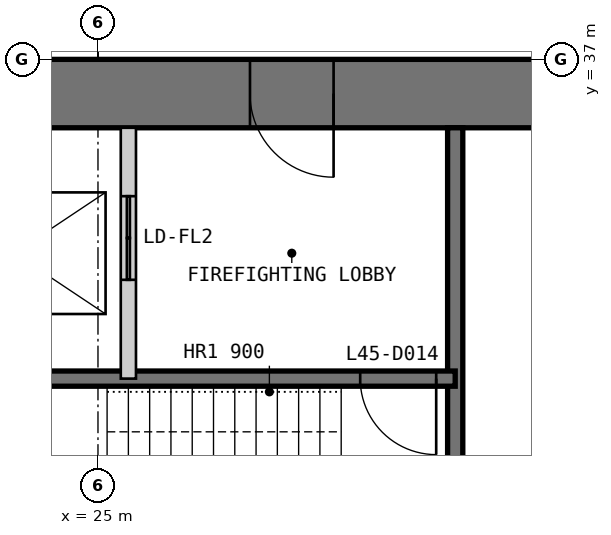
"""IFC4 building model, lengths in metres.
Left out: names, types, materials, properties, quantities, classifications, styles, units other than length and angle.
Written with IfcOpenShell. Run it as: python <this file> out.ifc"""

import sys

from ifc_helpers import new_model, si_unit, direction, frame, frame_2d, origin, place, context, subcontext, project, spatial, polyline, rectangle, outline, extrude, element, fill, save


model = new_model("IFC4")
c1 = context("Model", 3, precision=1e-05, world=origin(), true_north=direction((0.0, 1.0)))
c2 = subcontext(c1, "Body", "Model", "MODEL_VIEW")
j1 = project(units=[si_unit("LENGTHUNIT", "METRE"), si_unit("PLANEANGLEUNIT", "RADIAN")], contexts=[c1])
p1 = place(None, origin())
s1 = spatial("IfcSite", under=j1, at=p1, CompositionType="ELEMENT")
p2 = place(p1, origin())
s2 = spatial("IfcBuilding", under=s1, at=p2, CompositionType="ELEMENT")
p3 = place(p2, frame((0.0, 0.0, 193.8)))
s3 = spatial("IfcBuildingStorey", under=s2, at=p3, CompositionType="ELEMENT", Elevation=193.8)
p4 = place(p3, frame((37.0, 36.55, 0.0), z_axis=(0.0, 0.0, 1.0), x_axis=(-1.0, 0.0, 0.0)))
e1 = element("IfcWall", 1, at=p4, inside=s3, PredefinedType="SHEAR", context=c2, shape_type="SweptSolid", body=[
    extrude(outline(polyline([(0.0, -0.45), (24.0, -0.45), (23.1, 0.45), (0.9, 0.45), (0.0, -0.45)])), origin(), (0.0, 0.0, 1.0), 4.0),
])
p5 = place(p4, frame((4.9, 0.0, 0.0)))
e2 = element("IfcOpeningElement", 2, at=p5, cuts=e1, PredefinedType="OPENING", context=c2, shape_type="SweptSolid", body=[
    extrude(rectangle(XDim=1.0, YDim=2.2, at=frame_2d((0.5, 1.1))), frame((0.0, 0.46, 0.0), z_axis=(0.0, -1.0, 0.0), x_axis=(1.0, 0.0, 0.0)), (0.0, 0.0, 1.0), 0.92),
])
p6 = place(p4, frame((8.9, 0.0, 0.0)))
e3 = element("IfcOpeningElement", 3, at=p6, cuts=e1, PredefinedType="OPENING", context=c2, shape_type="SweptSolid", body=[
    extrude(rectangle(XDim=1.1, YDim=2.2, at=frame_2d((0.55, 1.1))), frame((0.0, 0.46, 0.0), z_axis=(0.0, -1.0, 0.0), x_axis=(1.0, 0.0, 0.0)), (0.0, 0.0, 1.0), 0.92),
])
p7 = place(p4, frame((15.05, 0.0, 0.0)))
e4 = element("IfcOpeningElement", 4, at=p7, cuts=e1, PredefinedType="OPENING", context=c2, shape_type="SweptSolid", body=[
    extrude(rectangle(XDim=0.9, YDim=2.2, at=frame_2d((0.45, 1.1))), frame((0.0, 0.46, 0.0), z_axis=(0.0, -1.0, 0.0), x_axis=(1.0, 0.0, 0.0)), (0.0, 0.0, 1.0), 0.92),
])
p8 = place(p4, frame((17.9, 0.0, 0.0)))
e5 = element("IfcOpeningElement", 5, at=p8, cuts=e1, PredefinedType="OPENING", context=c2, shape_type="SweptSolid", body=[
    extrude(rectangle(XDim=1.0, YDim=2.2, at=frame_2d((0.5, 1.1))), frame((0.0, 0.46, 0.0), z_axis=(0.0, -1.0, 0.0), x_axis=(1.0, 0.0, 0.0)), (0.0, 0.0, 1.0), 0.92),
])
p9 = place(p4, frame((21.4, 0.0, 0.0)))
e6 = element("IfcOpeningElement", 6, at=p9, cuts=e1, PredefinedType="OPENING", context=c2, shape_type="SweptSolid", body=[
    extrude(rectangle(XDim=1.0, YDim=2.2, at=frame_2d((0.5, 1.1))), frame((0.0, 0.46, 0.0), z_axis=(0.0, -1.0, 0.0), x_axis=(1.0, 0.0, 0.0)), (0.0, 0.0, 1.0), 0.92),
])
p10 = place(p3, frame((29.7, 36.1, 0.0), z_axis=(0.0, 0.0, 1.0), x_axis=(0.0, -1.0, 0.0)))
e7 = element("IfcWall", 7, at=p10, inside=s3, PredefinedType="SOLIDWALL", context=c2, shape_type="SweptSolid", body=[
    extrude(rectangle(XDim=16.1, YDim=0.2, at=frame_2d((8.05, 0.0))), origin(), (0.0, 0.0, 1.0), 3.8),
])
p11 = place(p10, frame((7.217, 0.0, 0.0)))
e8 = element("IfcOpeningElement", 8, at=p11, cuts=e7, PredefinedType="OPENING", context=c2, shape_type="SweptSolid", body=[
    extrude(rectangle(XDim=1.1, YDim=2.2, at=frame_2d((0.55, 1.1))), frame((0.0, 0.11, 0.0), z_axis=(0.0, -1.0, 0.0), x_axis=(1.0, 0.0, 0.0)), (0.0, 0.0, 1.0), 0.22),
])
p12 = place(p10, frame((10.55, 0.0, 0.0)))
e9 = element("IfcOpeningElement", 9, at=p12, cuts=e7, PredefinedType="OPENING", context=c2, shape_type="SweptSolid", body=[
    extrude(rectangle(XDim=1.1, YDim=2.2, at=frame_2d((0.55, 1.1))), frame((0.0, 0.11, 0.0), z_axis=(0.0, -1.0, 0.0), x_axis=(1.0, 0.0, 0.0)), (0.0, 0.0, 1.0), 0.22),
])
p13 = place(p10, frame((13.883, 0.0, 0.0)))
e10 = element("IfcOpeningElement", 10, at=p13, cuts=e7, PredefinedType="OPENING", context=c2, shape_type="SweptSolid", body=[
    extrude(rectangle(XDim=1.1, YDim=2.2, at=frame_2d((0.55, 1.1))), frame((0.0, 0.11, 0.0), z_axis=(0.0, -1.0, 0.0), x_axis=(1.0, 0.0, 0.0)), (0.0, 0.0, 1.0), 0.22),
])
p14 = place(p3, frame((29.7, 32.8, 0.0), z_axis=(0.0, 0.0, 1.0), x_axis=(-1.0, 0.0, 0.0)))
e11 = element("IfcWall", 11, at=p14, inside=s3, PredefinedType="SOLIDWALL", context=c2, shape_type="SweptSolid", body=[
    extrude(rectangle(XDim=9.4, YDim=0.2, at=frame_2d((4.7, 0.0))), origin(), (0.0, 0.0, 1.0), 3.8),
])
p15 = place(p14, frame((0.25, 0.0, 0.0)))
e12 = element("IfcOpeningElement", 12, at=p15, cuts=e11, PredefinedType="OPENING", context=c2, shape_type="SweptSolid", body=[
    extrude(rectangle(XDim=1.0, YDim=2.2, at=frame_2d((0.5, 1.1))), frame((0.0, 0.11, 0.0), z_axis=(0.0, -1.0, 0.0), x_axis=(1.0, 0.0, 0.0)), (0.0, 0.0, 1.0), 0.22),
])
p16 = place(p3, frame((25.4, 36.1, 0.0), z_axis=(0.0, 0.0, 1.0), x_axis=(0.0, -1.0, 0.0)))
e13 = element("IfcWall", 13, at=p16, inside=s3, PredefinedType="PARTITIONING", context=c2, shape_type="SweptSolid", body=[
    extrude(rectangle(XDim=3.3, YDim=0.2, at=frame_2d((1.65, 0.0))), origin(), (0.0, 0.0, 1.0), 3.8),
])
p17 = place(p16, frame((0.9, 0.0, 0.0)))
e14 = element("IfcOpeningElement", 14, at=p17, cuts=e13, PredefinedType="OPENING", context=c2, shape_type="SweptSolid", body=[
    extrude(rectangle(XDim=1.1, YDim=2.2, at=frame_2d((0.55, 1.1))), frame((0.0, 0.11, 0.0), z_axis=(0.0, -1.0, 0.0), x_axis=(1.0, 0.0, 0.0)), (0.0, 0.0, 1.0), 0.22),
])
p18 = place(p6, origin())
e15 = element("IfcDoor", 15, at=p18, inside=s3, OperationType="SINGLE_SWING_LEFT", PredefinedType="DOOR", context=c2, shape_type="SweptSolid", body=[
    extrude(rectangle(XDim=1.1, YDim=2.2, at=frame_2d((0.55, 1.1))), frame((0.0, 0.025, 0.0), z_axis=(0.0, -1.0, 0.0), x_axis=(1.0, 0.0, 0.0)), (0.0, 0.0, 1.0), 0.05),
    extrude(outline(polyline([(0.0, 0.0), (0.04, 0.0), (0.04, 2.16), (1.06, 2.16), (1.06, 0.0), (1.1, 0.0), (1.1, 2.2), (0.0, 2.2), (0.0, 0.0)])), frame((0.0, 0.3, 0.0), z_axis=(0.0, -1.0, 0.0), x_axis=(1.0, 0.0, 0.0)), (0.0, 0.0, 1.0), 0.6),
])
fill(e3, e15)
p19 = place(p15, origin())
e16 = element("IfcDoor", 16, at=p19, inside=s3, OperationType="SINGLE_SWING_LEFT", PredefinedType="DOOR", context=c2, shape_type="SweptSolid", body=[
    extrude(rectangle(XDim=1.0, YDim=2.2, at=frame_2d((0.5, 1.1))), frame((0.0, 0.025, 0.0), z_axis=(0.0, -1.0, 0.0), x_axis=(1.0, 0.0, 0.0)), (0.0, 0.0, 1.0), 0.05),
])
fill(e12, e16)
p20 = place(p17, origin())
e17 = element("IfcDoor", 17, at=p20, inside=s3, OperationType="DOUBLE_DOOR_SLIDING", PredefinedType="DOOR", context=c2, shape_type="SweptSolid", body=[
    extrude(rectangle(XDim=1.1, YDim=2.2, at=frame_2d((0.55, 1.1))), frame((0.0, 0.025, 0.0), z_axis=(0.0, -1.0, 0.0), x_axis=(1.0, 0.0, 0.0)), (0.0, 0.0, 1.0), 0.05),
])
fill(e14, e17)
save(model, sys.argv[1])
